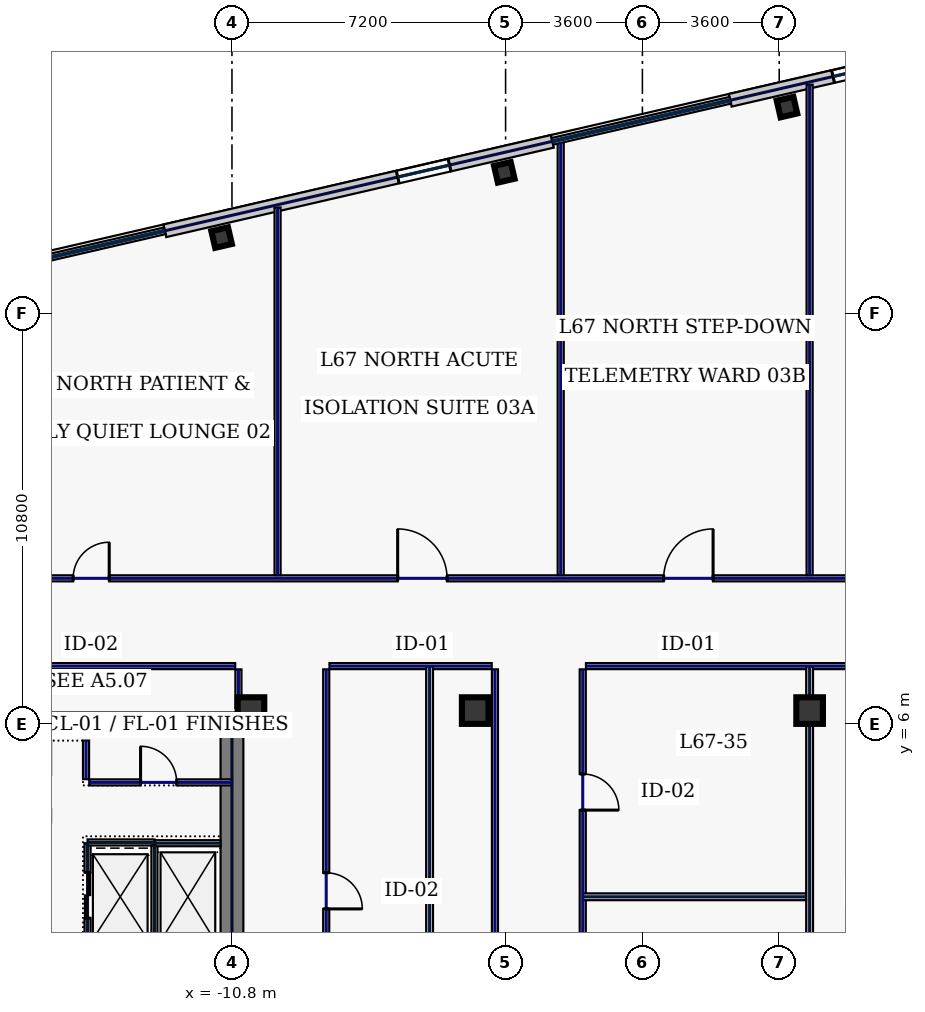
"""IFC4 building model, lengths in metres.
Left out: names, types, materials, properties, quantities, classifications, styles, units other than length and angle.
Written with IfcOpenShell. Run it as: python <this file> out.ifc"""

import sys

from ifc_helpers import new_model, si_unit, direction, frame, frame_2d, origin, origin_2d, place, context, subcontext, project, spatial, rectangle, hollow_rectangle, extrude, element, fill, save


model = new_model("IFC4")
c1 = context("Model", 3, precision=1e-05, world=origin(), true_north=direction((0.0, 1.0)))
c2 = subcontext(c1, "Body", "Model", "MODEL_VIEW")
j1 = project(units=[si_unit("LENGTHUNIT", "METRE"), si_unit("PLANEANGLEUNIT", "RADIAN")], contexts=[c1])
p1 = place(None, origin())
s1 = spatial("IfcSite", under=j1, at=p1, CompositionType="ELEMENT")
p2 = place(p1, origin())
s2 = spatial("IfcBuilding", under=s1, at=p2, CompositionType="ELEMENT")
p3 = place(p2, frame((0.0, 0.0, 289.0)))
s3 = spatial("IfcBuildingStorey", under=s2, at=p3, CompositionType="ELEMENT", Elevation=289.0)
p4 = place(p3, frame((-22.0, 6.0, 0.0), z_axis=(0.0, 0.0, 1.0), x_axis=(1.0, 0.0, 0.0)))
e1 = element("IfcWall", 1, at=p4, inside=s3, PredefinedType="SHEAR", context=c2, shape_type="SweptSolid", body=[
    extrude(rectangle(XDim=11.5, YDim=0.6, at=frame_2d((5.75, 0.0))), origin(), (0.0, 0.0, 1.0), 3.74),
])
p5 = place(p3, frame((-10.8, 0.05, 0.0), z_axis=(0.0, 0.0, 1.0), x_axis=(0.0, 1.0, 0.0)))
e2 = element("IfcWall", 2, at=p5, inside=s3, PredefinedType="SHEAR", context=c2, shape_type="SweptSolid", body=[
    extrude(rectangle(XDim=5.65, YDim=0.6, at=frame_2d((2.825, 0.0))), origin(), (0.0, 0.0, 1.0), 3.74),
])
for number, where, z_axis, x_axis in (
    (3, (-10.3, 6.35, 0.0), (0.0, 0.0, 1.0), (1.0, 0.0, 0.0)),
    (4, (-4.4, 6.35, 0.0), (0.0, 0.0, 1.0), (1.0, 0.0, 0.0)),
    (5, (4.4, 6.35, 0.0), (0.0, 0.0, 1.0), (1.0, 0.0, 0.0)),
):
    element("IfcColumn", number, at=place(p3, frame(where, z_axis=z_axis, x_axis=x_axis)), inside=s3, PredefinedType="COLUMN", context=c2, shape_type="SweptSolid", body=[
        extrude(hollow_rectangle(XDim=0.7, YDim=0.7, WallThickness=0.032, at=origin_2d()), origin(), (0.0, 0.0, 1.0), 3.74),
    ])
for number, where, z_axis, x_axis in (
    (6, (3.804, 22.232, 0.0), (0.0, 0.0, 1.0), (0.974, 0.225, 0.0)),
    (7, (-3.634, 20.514, 0.0), (0.0, 0.0, 1.0), (0.974, 0.225, 0.0)),
    (8, (-11.073, 18.797, 0.0), (0.0, 0.0, 1.0), (0.974, 0.225, 0.0)),
):
    element("IfcColumn", number, at=place(p3, frame(where, z_axis=z_axis, x_axis=x_axis)), inside=s3, PredefinedType="COLUMN", context=c2, shape_type="SweptSolid", body=[
        extrude(hollow_rectangle(XDim=0.45, YDim=0.45, WallThickness=0.022, at=origin_2d()), origin(), (0.0, 0.0, 1.0), 3.74),
    ])
p6 = place(p3, frame((19.229, 26.316, 0.0), z_axis=(0.0, 0.0, 1.0), x_axis=(-0.974372473594, -0.224940620392, 0.0)))
e9 = element("IfcWall", 9, at=p6, inside=s3, PredefinedType="STANDARD", context=c2, shape_type="SweptSolid", body=[
    extrude(rectangle(XDim=17.366, YDim=0.34, at=frame_2d((8.683, 0.0))), origin(), (0.0, 0.0, 1.0), 3.74),
])
p7 = place(p6, frame((13.187, 0.0, 1.0)))
e10 = element("IfcOpeningElement", 10, at=p7, cuts=e9, PredefinedType="OPENING", context=c2, shape_type="SweptSolid", body=[
    extrude(rectangle(XDim=1.4, YDim=1.85, at=frame_2d((0.7, 0.925))), frame((0.0, 0.18, 0.0), z_axis=(0.0, -1.0, 0.0), x_axis=(1.0, 0.0, 0.0)), (0.0, 0.0, 1.0), 0.36),
])
p8 = place(p6, frame((9.676, 0.0, 1.0)))
e11 = element("IfcOpeningElement", 11, at=p8, cuts=e9, PredefinedType="OPENING", context=c2, shape_type="SweptSolid", body=[
    extrude(rectangle(XDim=1.4, YDim=1.85, at=frame_2d((0.7, 0.925))), frame((0.0, 0.18, 0.0), z_axis=(0.0, -1.0, 0.0), x_axis=(1.0, 0.0, 0.0)), (0.0, 0.0, 1.0), 0.36),
])
p9 = place(p6, frame((5.553, 0.0, 1.0)))
e12 = element("IfcOpeningElement", 12, at=p9, cuts=e9, PredefinedType="OPENING", context=c2, shape_type="SweptSolid", body=[
    extrude(rectangle(XDim=1.4, YDim=1.85, at=frame_2d((0.7, 0.925))), frame((0.0, 0.18, 0.0), z_axis=(0.0, -1.0, 0.0), x_axis=(1.0, 0.0, 0.0)), (0.0, 0.0, 1.0), 0.36),
])
p10 = place(p3, frame((-2.368, 21.33, 0.0), z_axis=(0.0, 0.0, 1.0), x_axis=(-0.974367213107, -0.224963405961, 0.0)))
e13 = element("IfcWall", 13, at=p10, inside=s3, PredefinedType="STANDARD", context=c2, shape_type="SweptSolid", body=[
    extrude(rectangle(XDim=10.468, YDim=0.34, at=frame_2d((5.234, 0.0))), origin(), (0.0, 0.0, 1.0), 3.74),
])
p11 = place(p10, frame((2.778, 0.0, 1.0)))
e14 = element("IfcOpeningElement", 14, at=p11, cuts=e13, PredefinedType="OPENING", context=c2, shape_type="SweptSolid", body=[
    extrude(rectangle(XDim=1.4, YDim=1.85, at=frame_2d((0.7, 0.925))), frame((0.0, 0.18, 0.0), z_axis=(0.0, -1.0, 0.0), x_axis=(1.0, 0.0, 0.0)), (0.0, 0.0, 1.0), 0.36),
])
p12 = place(p3, frame((-14.6, 0.12, 0.0), z_axis=(0.0, 0.0, 1.0), x_axis=(0.0, 1.0, 0.0)))
e15 = element("IfcWall", 15, at=p12, inside=s3, PredefinedType="PARTITIONING", context=c2, shape_type="SweptSolid", body=[
    extrude(rectangle(XDim=2.74, YDim=0.16, at=frame_2d((1.37, 0.0))), origin(), (0.0, 0.0, 1.0), 3.74),
])
p13 = place(p12, frame((0.77, 0.0, 0.0)))
e16 = element("IfcOpeningElement", 16, at=p13, cuts=e15, PredefinedType="OPENING", context=c2, shape_type="SweptSolid", body=[
    extrude(rectangle(XDim=1.2, YDim=2.2, at=frame_2d((0.6, 1.1))), frame((0.0, 0.09, 0.0), z_axis=(0.0, -1.0, 0.0), x_axis=(1.0, 0.0, 0.0)), (0.0, 0.0, 1.0), 0.18),
])
p14 = place(p3, frame((-14.6, 2.88, 0.0), z_axis=(0.0, 0.0, 1.0), x_axis=(1.0, 0.0, 0.0)))
e17 = element("IfcWall", 17, at=p14, inside=s3, PredefinedType="PARTITIONING", context=c2, shape_type="SweptSolid", body=[
    extrude(rectangle(XDim=1.76, YDim=0.16, at=frame_2d((0.88, 0.0))), origin(), (0.0, 0.0, 1.0), 3.74),
])
p15 = place(p3, frame((-12.84, 0.18, 0.0), z_axis=(0.0, 0.0, 1.0), x_axis=(0.0, 1.0, 0.0)))
e18 = element("IfcWall", 18, at=p15, inside=s3, PredefinedType="PARTITIONING", context=c2, shape_type="SweptSolid", body=[
    extrude(rectangle(XDim=2.62, YDim=0.16, at=frame_2d((1.31, 0.0))), origin(), (0.0, 0.0, 1.0), 3.74),
])
p16 = place(p3, frame((-12.82, 2.86, 0.0), z_axis=(0.0, 0.0, 1.0), x_axis=(1.0, 0.0, 0.0)))
e19 = element("IfcWall", 19, at=p16, inside=s3, PredefinedType="PARTITIONING", context=c2, shape_type="SweptSolid", body=[
    extrude(rectangle(XDim=1.72, YDim=0.16, at=frame_2d((0.86, 0.0))), origin(), (0.0, 0.0, 1.0), 3.74),
])
p17 = place(p3, frame((-14.555, 4.46, 0.0), z_axis=(0.0, 0.0, 1.0), x_axis=(1.0, 0.0, 0.0)))
e20 = element("IfcWall", 20, at=p17, inside=s3, PredefinedType="PARTITIONING", context=c2, shape_type="SweptSolid", body=[
    extrude(rectangle(XDim=3.755, YDim=0.16, at=frame_2d((1.877, 0.0))), origin(), (0.0, 0.0, 1.0), 3.74),
])
p18 = place(p17, frame((1.35, 0.0, 0.0)))
e21 = element("IfcOpeningElement", 21, at=p18, cuts=e20, PredefinedType="OPENING", context=c2, shape_type="SweptSolid", body=[
    extrude(rectangle(XDim=0.95, YDim=2.2, at=frame_2d((0.475, 1.1))), frame((0.0, 0.09, 0.0), z_axis=(0.0, -1.0, 0.0), x_axis=(1.0, 0.0, 0.0)), (0.0, 0.0, 1.0), 0.18),
])
p19 = place(p3, frame((-14.64, 4.545, 0.0), z_axis=(0.0, 0.0, 1.0), x_axis=(0.0, 1.0, 0.0)))
e22 = element("IfcWall", 22, at=p19, inside=s3, PredefinedType="PARTITIONING", context=c2, shape_type="SweptSolid", body=[
    extrude(rectangle(XDim=1.015, YDim=0.16, at=frame_2d((0.508, 0.0))), origin(), (0.0, 0.0, 1.0), 3.74),
])
p20 = place(p3, frame((-24.145, 9.83, 0.0), z_axis=(0.0, 0.0, 1.0), x_axis=(1.0, 0.0, 0.0)))
e23 = element("IfcWall", 23, at=p20, inside=s3, PredefinedType="PARTITIONING", context=c2, shape_type="SweptSolid", body=[
    extrude(rectangle(XDim=48.29, YDim=0.16, at=frame_2d((24.145, 0.0))), origin(), (0.0, 0.0, 1.0), 3.74),
])
p21 = place(p20, frame((2.044, 0.0, 0.0)))
e24 = element("IfcOpeningElement", 24, at=p21, cuts=e23, PredefinedType="OPENING", context=c2, shape_type="SweptSolid", body=[
    extrude(rectangle(XDim=0.95, YDim=2.2, at=frame_2d((0.475, 1.1))), frame((0.0, 0.09, 0.0), z_axis=(0.0, -1.0, 0.0), x_axis=(1.0, 0.0, 0.0)), (0.0, 0.0, 1.0), 0.18),
])
p22 = place(p20, frame((9.165, 0.0, 0.0)))
e25 = element("IfcOpeningElement", 25, at=p22, cuts=e23, PredefinedType="OPENING", context=c2, shape_type="SweptSolid", body=[
    extrude(rectangle(XDim=0.95, YDim=2.2, at=frame_2d((0.475, 1.1))), frame((0.0, 0.09, 0.0), z_axis=(0.0, -1.0, 0.0), x_axis=(1.0, 0.0, 0.0)), (0.0, 0.0, 1.0), 0.18),
])
p23 = place(p20, frame((17.705, 0.0, 0.0)))
e26 = element("IfcOpeningElement", 26, at=p23, cuts=e23, PredefinedType="OPENING", context=c2, shape_type="SweptSolid", body=[
    extrude(rectangle(XDim=1.3, YDim=2.2, at=frame_2d((0.65, 1.1))), frame((0.0, 0.09, 0.0), z_axis=(0.0, -1.0, 0.0), x_axis=(1.0, 0.0, 0.0)), (0.0, 0.0, 1.0), 0.18),
])
p24 = place(p20, frame((24.705, 0.0, 0.0)))
e27 = element("IfcOpeningElement", 27, at=p24, cuts=e23, PredefinedType="OPENING", context=c2, shape_type="SweptSolid", body=[
    extrude(rectangle(XDim=1.3, YDim=2.2, at=frame_2d((0.65, 1.1))), frame((0.0, 0.09, 0.0), z_axis=(0.0, -1.0, 0.0), x_axis=(1.0, 0.0, 0.0)), (0.0, 0.0, 1.0), 0.18),
])
p25 = place(p20, frame((31.405, 0.0, 0.0)))
e28 = element("IfcOpeningElement", 28, at=p25, cuts=e23, PredefinedType="OPENING", context=c2, shape_type="SweptSolid", body=[
    extrude(rectangle(XDim=1.3, YDim=2.2, at=frame_2d((0.65, 1.1))), frame((0.0, 0.09, 0.0), z_axis=(0.0, -1.0, 0.0), x_axis=(1.0, 0.0, 0.0)), (0.0, 0.0, 1.0), 0.18),
])
p26 = place(p20, frame((37.98, 0.0, 0.0)))
e29 = element("IfcOpeningElement", 29, at=p26, cuts=e23, PredefinedType="OPENING", context=c2, shape_type="SweptSolid", body=[
    extrude(rectangle(XDim=0.95, YDim=2.2, at=frame_2d((0.475, 1.1))), frame((0.0, 0.09, 0.0), z_axis=(0.0, -1.0, 0.0), x_axis=(1.0, 0.0, 0.0)), (0.0, 0.0, 1.0), 0.18),
])
p27 = place(p20, frame((44.276, 0.0, 0.0)))
e30 = element("IfcOpeningElement", 30, at=p27, cuts=e23, PredefinedType="OPENING", context=c2, shape_type="SweptSolid", body=[
    extrude(rectangle(XDim=1.15, YDim=2.2, at=frame_2d((0.575, 1.1))), frame((0.0, 0.09, 0.0), z_axis=(0.0, -1.0, 0.0), x_axis=(1.0, 0.0, 0.0)), (0.0, 0.0, 1.0), 0.18),
])
p28 = place(p3, frame((8.235, 7.52, 0.0), z_axis=(0.0, 0.0, 1.0), x_axis=(-1.0, 0.0, 0.0)))
e31 = element("IfcWall", 31, at=p28, inside=s3, PredefinedType="PARTITIONING", context=c2, shape_type="SweptSolid", body=[
    extrude(rectangle(XDim=9.72, YDim=0.16, at=frame_2d((4.86, 0.0))), origin(), (0.0, 0.0, 1.0), 3.74),
])
p29 = place(p3, frame((-1.57, 7.435, 0.0), z_axis=(0.0, 0.0, 1.0), x_axis=(0.0, -1.0, 0.0)))
e32 = element("IfcWall", 32, at=p29, inside=s3, PredefinedType="PARTITIONING", context=c2, shape_type="SweptSolid", body=[
    extrude(rectangle(XDim=14.82, YDim=0.16, at=frame_2d((7.41, 0.0))), origin(), (0.0, 0.0, 1.0), 3.74),
])
p30 = place(p29, frame((9.861, 0.0, 0.0)))
e33 = element("IfcOpeningElement", 33, at=p30, cuts=e32, PredefinedType="OPENING", context=c2, shape_type="SweptSolid", body=[
    extrude(rectangle(XDim=0.95, YDim=2.2, at=frame_2d((0.475, 1.1))), frame((0.0, 0.09, 0.0), z_axis=(0.0, -1.0, 0.0), x_axis=(1.0, 0.0, 0.0)), (0.0, 0.0, 1.0), 0.18),
])
p31 = place(p29, frame((2.754, 0.0, 0.0)))
e34 = element("IfcOpeningElement", 34, at=p31, cuts=e32, PredefinedType="OPENING", context=c2, shape_type="SweptSolid", body=[
    extrude(rectangle(XDim=0.95, YDim=2.2, at=frame_2d((0.475, 1.1))), frame((0.0, 0.09, 0.0), z_axis=(0.0, -1.0, 0.0), x_axis=(1.0, 0.0, 0.0)), (0.0, 0.0, 1.0), 0.18),
])
p32 = place(p3, frame((-3.88, -7.385, 0.0), z_axis=(0.0, 0.0, 1.0), x_axis=(0.0, 1.0, 0.0)))
e35 = element("IfcWall", 35, at=p32, inside=s3, PredefinedType="PARTITIONING", context=c2, shape_type="SweptSolid", body=[
    extrude(rectangle(XDim=14.82, YDim=0.16, at=frame_2d((7.41, 0.0))), origin(), (0.0, 0.0, 1.0), 3.74),
])
p33 = place(p3, frame((-3.965, 7.52, 0.0), z_axis=(0.0, 0.0, 1.0), x_axis=(-1.0, 0.0, 0.0)))
e36 = element("IfcWall", 36, at=p33, inside=s3, PredefinedType="PARTITIONING", context=c2, shape_type="SweptSolid", body=[
    extrude(rectangle(XDim=4.27, YDim=0.16, at=frame_2d((2.135, 0.0))), origin(), (0.0, 0.0, 1.0), 3.74),
])
p34 = place(p3, frame((-8.32, 7.435, 0.0), z_axis=(0.0, 0.0, 1.0), x_axis=(0.0, -1.0, 0.0)))
e37 = element("IfcWall", 37, at=p34, inside=s3, PredefinedType="PARTITIONING", context=c2, shape_type="SweptSolid", body=[
    extrude(rectangle(XDim=14.82, YDim=0.16, at=frame_2d((7.41, 0.0))), origin(), (0.0, 0.0, 1.0), 3.74),
])
p35 = place(p34, frame((12.461, 0.0, 0.0)))
e38 = element("IfcOpeningElement", 38, at=p35, cuts=e37, PredefinedType="OPENING", context=c2, shape_type="SweptSolid", body=[
    extrude(rectangle(XDim=0.95, YDim=2.2, at=frame_2d((0.475, 1.1))), frame((0.0, 0.09, 0.0), z_axis=(0.0, -1.0, 0.0), x_axis=(1.0, 0.0, 0.0)), (0.0, 0.0, 1.0), 0.18),
])
p36 = place(p34, frame((5.354, 0.0, 0.0)))
e39 = element("IfcOpeningElement", 39, at=p36, cuts=e37, PredefinedType="OPENING", context=c2, shape_type="SweptSolid", body=[
    extrude(rectangle(XDim=0.95, YDim=2.2, at=frame_2d((0.475, 1.1))), frame((0.0, 0.09, 0.0), z_axis=(0.0, -1.0, 0.0), x_axis=(1.0, 0.0, 0.0)), (0.0, 0.0, 1.0), 0.18),
])
p37 = place(p3, frame((-10.63, 6.42, 0.0), z_axis=(0.0, 0.0, 1.0), x_axis=(0.0, 1.0, 0.0)))
e40 = element("IfcWall", 40, at=p37, inside=s3, PredefinedType="PARTITIONING", context=c2, shape_type="SweptSolid", body=[
    extrude(rectangle(XDim=1.015, YDim=0.16, at=frame_2d((0.508, 0.0))), origin(), (0.0, 0.0, 1.0), 3.74),
])
p38 = place(p3, frame((-10.715, 7.52, 0.0), z_axis=(0.0, 0.0, 1.0), x_axis=(-1.0, 0.0, 0.0)))
e41 = element("IfcWall", 41, at=p38, inside=s3, PredefinedType="PARTITIONING", context=c2, shape_type="SweptSolid", body=[
    extrude(rectangle(XDim=11.2, YDim=0.16, at=frame_2d((5.6, 0.0))), origin(), (0.0, 0.0, 1.0), 3.74),
])
p39 = place(p3, frame((-9.6, 9.915, 0.0), z_axis=(0.0, 0.0, 1.0), x_axis=(0.0, 1.0, 0.0)))
e42 = element("IfcWall", 42, at=p39, inside=s3, PredefinedType="PARTITIONING", context=c2, shape_type="SweptSolid", body=[
    extrude(rectangle(XDim=9.673, YDim=0.16, at=frame_2d((4.837, 0.0))), origin(), (0.0, 0.0, 1.0), 3.74),
])
p40 = place(p3, frame((4.4, 9.915, 0.0), z_axis=(0.0, 0.0, 1.0), x_axis=(0.0, 1.0, 0.0)))
e43 = element("IfcWall", 43, at=p40, inside=s3, PredefinedType="PARTITIONING", context=c2, shape_type="SweptSolid", body=[
    extrude(rectangle(XDim=12.906, YDim=0.16, at=frame_2d((6.453, 0.0))), origin(), (0.0, 0.0, 1.0), 3.335),
])
p41 = place(p3, frame((-2.15, 9.915, 0.0), z_axis=(0.0, 0.0, 1.0), x_axis=(0.0, 1.0, 0.0)))
e44 = element("IfcWall", 44, at=p41, inside=s3, PredefinedType="PARTITIONING", context=c2, shape_type="SweptSolid", body=[
    extrude(rectangle(XDim=11.394, YDim=0.16, at=frame_2d((5.697, 0.0))), origin(), (0.0, 0.0, 1.0), 3.74),
])
p42 = place(p3, frame((-5.6, -7.465, 0.0), z_axis=(0.0, 0.0, 1.0), x_axis=(0.0, 1.0, 0.0)))
e45 = element("IfcWall", 45, at=p42, inside=s3, PredefinedType="PARTITIONING", context=c2, shape_type="SweptSolid", body=[
    extrude(rectangle(XDim=14.98, YDim=0.18, at=frame_2d((7.49, 0.0))), origin(), (0.0, 0.0, 1.0), 3.74),
])
p43 = place(p3, frame((4.4, -7.465, 0.0), z_axis=(0.0, 0.0, 1.0), x_axis=(0.0, 1.0, 0.0)))
e46 = element("IfcWall", 46, at=p43, inside=s3, PredefinedType="PARTITIONING", context=c2, shape_type="SweptSolid", body=[
    extrude(rectangle(XDim=14.98, YDim=0.18, at=frame_2d((7.49, 0.0))), origin(), (0.0, 0.0, 1.0), 3.035),
])
p44 = place(p3, frame((-1.565, 1.45, 0.0), z_axis=(0.0, 0.0, 1.0), x_axis=(1.0, 0.0, 0.0)))
e47 = element("IfcWall", 47, at=p44, inside=s3, PredefinedType="PARTITIONING", context=c2, shape_type="SweptSolid", body=[
    extrude(rectangle(XDim=5.87, YDim=0.18, at=frame_2d((2.935, 0.0))), origin(), (0.0, 0.0, 1.0), 3.74),
])
p45 = place(p7, origin())
e48 = element("IfcWindow", 48, at=p45, inside=s3, PartitioningType="SINGLE_PANEL", PredefinedType="WINDOW", context=c2, shape_type="SweptSolid", body=[
    extrude(rectangle(XDim=1.4, YDim=1.85, at=frame_2d((0.7, 0.925))), frame((0.0, 0.03, 0.0), z_axis=(0.0, -1.0, 0.0), x_axis=(1.0, 0.0, 0.0)), (0.0, 0.0, 1.0), 0.06),
])
fill(e10, e48)
p46 = place(p11, origin())
e49 = element("IfcWindow", 49, at=p46, inside=s3, PartitioningType="SINGLE_PANEL", PredefinedType="WINDOW", context=c2, shape_type="SweptSolid", body=[
    extrude(rectangle(XDim=1.4, YDim=1.85, at=frame_2d((0.7, 0.925))), frame((0.0, 0.03, 0.0), z_axis=(0.0, -1.0, 0.0), x_axis=(1.0, 0.0, 0.0)), (0.0, 0.0, 1.0), 0.06),
])
fill(e14, e49)
p47 = place(p13, origin())
e50 = element("IfcDoor", 50, at=p47, inside=s3, OperationType="SLIDING_TO_LEFT", PredefinedType="DOOR", context=c2, shape_type="SweptSolid", body=[
    extrude(rectangle(XDim=1.2, YDim=2.2, at=frame_2d((0.6, 1.1))), frame((0.0, 0.025, 0.0), z_axis=(0.0, -1.0, 0.0), x_axis=(1.0, 0.0, 0.0)), (0.0, 0.0, 1.0), 0.05),
])
fill(e16, e50)
p48 = place(p18, origin())
e51 = element("IfcDoor", 51, at=p48, inside=s3, OperationType="SINGLE_SWING_LEFT", PredefinedType="DOOR", context=c2, shape_type="SweptSolid", body=[
    extrude(rectangle(XDim=0.95, YDim=2.2, at=frame_2d((0.475, 1.1))), frame((0.0, 0.025, 0.0), z_axis=(0.0, -1.0, 0.0), x_axis=(1.0, 0.0, 0.0)), (0.0, 0.0, 1.0), 0.05),
])
fill(e21, e51)
p49 = place(p22, origin())
e52 = element("IfcDoor", 52, at=p49, inside=s3, OperationType="SINGLE_SWING_RIGHT", PredefinedType="DOOR", context=c2, shape_type="SweptSolid", body=[
    extrude(rectangle(XDim=0.95, YDim=2.2, at=frame_2d((0.475, 1.1))), frame((0.0, 0.025, 0.0), z_axis=(0.0, -1.0, 0.0), x_axis=(1.0, 0.0, 0.0)), (0.0, 0.0, 1.0), 0.05),
])
fill(e25, e52)
p50 = place(p23, origin())
e53 = element("IfcDoor", 53, at=p50, inside=s3, OperationType="SINGLE_SWING_LEFT", PredefinedType="DOOR", context=c2, shape_type="SweptSolid", body=[
    extrude(rectangle(XDim=1.3, YDim=2.2, at=frame_2d((0.65, 1.1))), frame((0.0, 0.025, 0.0), z_axis=(0.0, -1.0, 0.0), x_axis=(1.0, 0.0, 0.0)), (0.0, 0.0, 1.0), 0.05),
])
fill(e26, e53)
p51 = place(p24, origin())
e54 = element("IfcDoor", 54, at=p51, inside=s3, OperationType="SINGLE_SWING_RIGHT", PredefinedType="DOOR", context=c2, shape_type="SweptSolid", body=[
    extrude(rectangle(XDim=1.3, YDim=2.2, at=frame_2d((0.65, 1.1))), frame((0.0, 0.025, 0.0), z_axis=(0.0, -1.0, 0.0), x_axis=(1.0, 0.0, 0.0)), (0.0, 0.0, 1.0), 0.05),
])
fill(e27, e54)
p52 = place(p36, origin())
e55 = element("IfcDoor", 55, at=p52, inside=s3, OperationType="SINGLE_SWING_RIGHT", PredefinedType="DOOR", context=c2, shape_type="SweptSolid", body=[
    extrude(rectangle(XDim=0.95, YDim=2.2, at=frame_2d((0.475, 1.1))), frame((0.0, 0.025, 0.0), z_axis=(0.0, -1.0, 0.0), x_axis=(1.0, 0.0, 0.0)), (0.0, 0.0, 1.0), 0.05),
])
fill(e39, e55)
p53 = place(p31, origin())
e56 = element("IfcDoor", 56, at=p53, inside=s3, OperationType="SINGLE_SWING_RIGHT", PredefinedType="DOOR", context=c2, shape_type="SweptSolid", body=[
    extrude(rectangle(XDim=0.95, YDim=2.2, at=frame_2d((0.475, 1.1))), frame((0.0, 0.025, 0.0), z_axis=(0.0, -1.0, 0.0), x_axis=(1.0, 0.0, 0.0)), (0.0, 0.0, 1.0), 0.05),
])
fill(e34, e56)
save(model, sys.argv[1])
